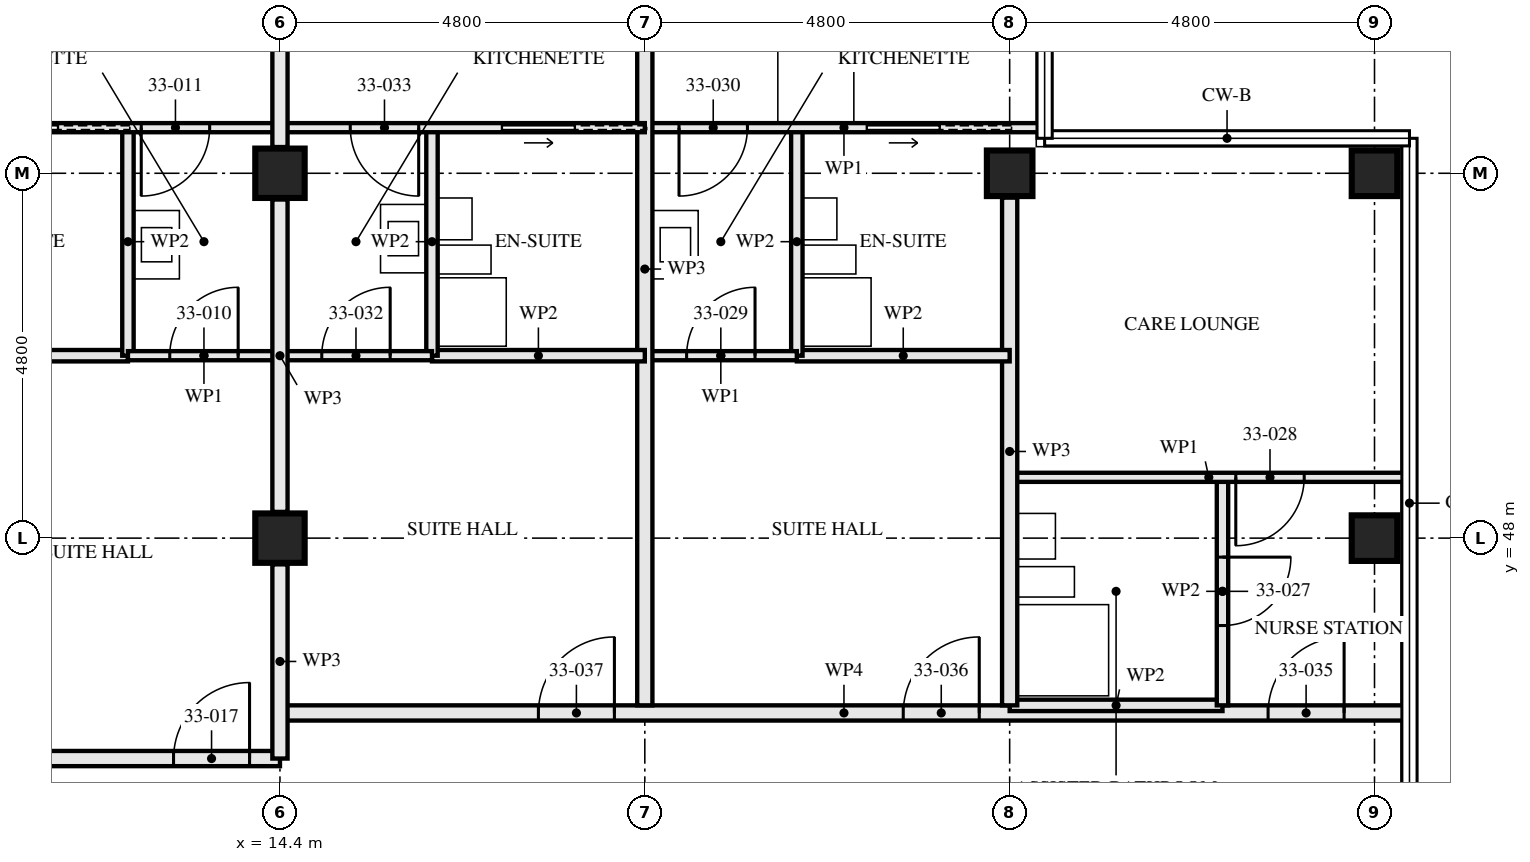
"""IFC4 building model, lengths in metres.
Left out: names, types, materials, properties, quantities, classifications, styles, units other than length and angle.
Written with IfcOpenShell. Run it as: python <this file> out.ifc"""

import sys

from ifc_helpers import new_model, si_unit, direction, frame, frame_2d, origin, origin_2d, place, context, subcontext, project, spatial, rectangle, hollow_rectangle, extrude, element, fill, save


model = new_model("IFC4")
c1 = context("Model", 3, precision=1e-05, world=origin(), true_north=direction((0.0, 1.0)))
c2 = subcontext(c1, "Body", "Model", "MODEL_VIEW")
j1 = project(units=[si_unit("LENGTHUNIT", "METRE"), si_unit("PLANEANGLEUNIT", "RADIAN")], contexts=[c1])
p1 = place(None, origin())
s1 = spatial("IfcSite", under=j1, at=p1, CompositionType="ELEMENT")
p2 = place(p1, origin())
s2 = spatial("IfcBuilding", under=s1, at=p2, CompositionType="ELEMENT")
p3 = place(p2, frame((0.0, 0.0, 122.5)))
s3 = spatial("IfcBuildingStorey", under=s2, at=p3, CompositionType="ELEMENT", Elevation=122.5)
for number, where, z_axis, x_axis in (
    (1, (14.4, 48.0, 0.0), (0.0, 0.0, 1.0), (1.0, 0.0, 0.0)),
    (2, (14.4, 52.8, 0.0), (0.0, 0.0, 1.0), (1.0, 0.0, 0.0)),
):
    element("IfcColumn", number, at=place(p3, frame(where, z_axis=z_axis, x_axis=x_axis)), inside=s3, PredefinedType="COLUMN", context=c2, shape_type="SweptSolid", body=[
        extrude(hollow_rectangle(XDim=0.65, YDim=0.65, WallThickness=0.05, at=origin_2d()), origin(), (0.0, 0.0, 1.0), 3.5),
    ])
for number, where, z_axis, x_axis in (
    (3, (24.0, 52.8, 0.0), (0.0, 0.0, 1.0), (0.0, 1.0, 0.0)),
    (4, (28.8, 48.0, 0.0), (0.0, 0.0, 1.0), (1.0, 0.0, 0.0)),
    (5, (28.8, 52.8, 0.0), (0.0, 0.0, 1.0), (0.0, 1.0, 0.0)),
):
    element("IfcColumn", number, at=place(p3, frame(where, z_axis=z_axis, x_axis=x_axis)), inside=s3, PredefinedType="COLUMN", context=c2, shape_type="SweptSolid", body=[
        extrude(hollow_rectangle(XDim=0.6, YDim=0.6, WallThickness=0.08, at=origin_2d()), origin(), (0.0, 0.0, 1.0), 3.5),
    ])
p4 = place(p3, frame((12.4, 53.4, 0.0), z_axis=(0.0, 0.0, 1.0), x_axis=(0.0, -1.0, 0.0)))
e6 = element("IfcWall", 6, at=p4, inside=s3, PredefinedType="PARTITIONING", context=c2, shape_type="SweptSolid", body=[
    extrude(rectangle(XDim=3.0, YDim=0.15, at=frame_2d((1.5, 0.0))), origin(), (0.0, 0.0, 1.0), 2.55),
])
p5 = place(p3, frame((12.4, 50.4, 0.0), z_axis=(0.0, 0.0, 1.0), x_axis=(-1.0, 0.0, 0.0)))
e7 = element("IfcWall", 7, at=p5, inside=s3, PredefinedType="PARTITIONING", context=c2, shape_type="SweptSolid", body=[
    extrude(rectangle(XDim=2.8, YDim=0.15, at=frame_2d((1.4, 0.0))), origin(), (0.0, 0.0, 1.0), 3.33),
])
p6 = place(p3, frame((14.4, 50.4, 0.0), z_axis=(0.0, 0.0, 1.0), x_axis=(-1.0, 0.0, 0.0)))
e8 = element("IfcWall", 8, at=p6, inside=s3, PredefinedType="PARTITIONING", context=c2, shape_type="SweptSolid", body=[
    extrude(rectangle(XDim=2.0, YDim=0.12, at=frame_2d((1.0, 0.0))), origin(), (0.0, 0.0, 1.0), 3.33),
])
p7 = place(p6, frame((0.55, 0.0, 0.0)))
e9 = element("IfcOpeningElement", 9, at=p7, cuts=e8, PredefinedType="OPENING", context=c2, shape_type="SweptSolid", body=[
    extrude(rectangle(XDim=0.9, YDim=2.1, at=frame_2d((0.45, 1.05))), frame((0.0, 0.071, 0.0), z_axis=(0.0, -1.0, 0.0), x_axis=(1.0, 0.0, 0.0)), (0.0, 0.0, 1.0), 0.141),
])
p8 = place(p3, frame((14.4, 53.4, 0.0), z_axis=(0.0, 0.0, 1.0), x_axis=(-1.0, 0.0, 0.0)))
e10 = element("IfcWall", 10, at=p8, inside=s3, PredefinedType="PARTITIONING", context=c2, shape_type="SweptSolid", body=[
    extrude(rectangle(XDim=4.8, YDim=0.12, at=frame_2d((2.4, 0.0))), origin(), (0.0, 0.0, 1.0), 3.33),
])
p9 = place(p8, frame((0.925, 0.0, 0.0)))
e11 = element("IfcOpeningElement", 11, at=p9, cuts=e10, PredefinedType="OPENING", context=c2, shape_type="SweptSolid", body=[
    extrude(rectangle(XDim=0.9, YDim=2.1, at=frame_2d((0.45, 1.05))), frame((0.0, 0.071, 0.0), z_axis=(0.0, -1.0, 0.0), x_axis=(1.0, 0.0, 0.0)), (0.0, 0.0, 1.0), 0.141),
])
p10 = place(p8, frame((2.925, 0.0, 0.0)))
e12 = element("IfcOpeningElement", 12, at=p10, cuts=e10, PredefinedType="OPENING", context=c2, shape_type="SweptSolid", body=[
    extrude(rectangle(XDim=0.95, YDim=2.1, at=frame_2d((0.475, 1.05))), frame((0.0, 0.071, 0.0), z_axis=(0.0, -1.0, 0.0), x_axis=(1.0, 0.0, 0.0)), (0.0, 0.0, 1.0), 0.141),
])
p11 = place(p3, frame((14.4, 45.1, 0.0), z_axis=(0.0, 0.0, 1.0), x_axis=(-1.0, 0.0, 0.0)))
e13 = element("IfcWall", 13, at=p11, inside=s3, PredefinedType="PARTITIONING", context=c2, shape_type="SweptSolid", body=[
    extrude(rectangle(XDim=9.6, YDim=0.2, at=frame_2d((4.8, 0.0))), origin(), (0.0, 0.0, 1.0), 3.33),
])
p12 = place(p11, frame((0.4, 0.0, 0.0)))
e14 = element("IfcOpeningElement", 14, at=p12, cuts=e13, PredefinedType="OPENING", context=c2, shape_type="SweptSolid", body=[
    extrude(rectangle(XDim=1.0, YDim=2.1, at=frame_2d((0.5, 1.05))), frame((0.0, 0.111, 0.0), z_axis=(0.0, -1.0, 0.0), x_axis=(1.0, 0.0, 0.0)), (0.0, 0.0, 1.0), 0.221),
])
p13 = place(p11, frame((5.2, 0.0, 0.0)))
e15 = element("IfcOpeningElement", 15, at=p13, cuts=e13, PredefinedType="OPENING", context=c2, shape_type="SweptSolid", body=[
    extrude(rectangle(XDim=1.0, YDim=2.1, at=frame_2d((0.5, 1.05))), frame((0.0, 0.111, 0.0), z_axis=(0.0, -1.0, 0.0), x_axis=(1.0, 0.0, 0.0)), (0.0, 0.0, 1.0), 0.221),
])
p14 = place(p3, frame((26.8, 48.8, 0.0), z_axis=(0.0, 0.0, 1.0), x_axis=(0.0, -1.0, 0.0)))
e16 = element("IfcWall", 16, at=p14, inside=s3, PredefinedType="PARTITIONING", context=c2, shape_type="SweptSolid", body=[
    extrude(rectangle(XDim=3.0, YDim=0.15, at=frame_2d((1.5, 0.0))), origin(), (0.0, 0.0, 1.0), 2.55),
])
p15 = place(p14, frame((1.05, 0.0, 0.0)))
e17 = element("IfcOpeningElement", 17, at=p15, cuts=e16, PredefinedType="OPENING", context=c2, shape_type="SweptSolid", body=[
    extrude(rectangle(XDim=0.9, YDim=2.1, at=frame_2d((0.45, 1.05))), frame((0.0, 0.085, 0.0), z_axis=(0.0, -1.0, 0.0), x_axis=(1.0, 0.0, 0.0)), (0.0, 0.0, 1.0), 0.171),
])
p16 = place(p3, frame((26.8, 45.8, 0.0), z_axis=(0.0, 0.0, 1.0), x_axis=(-1.0, 0.0, 0.0)))
e18 = element("IfcWall", 18, at=p16, inside=s3, PredefinedType="PARTITIONING", context=c2, shape_type="SweptSolid", body=[
    extrude(rectangle(XDim=2.8, YDim=0.15, at=frame_2d((1.4, 0.0))), origin(), (0.0, 0.0, 1.0), 3.33),
])
p17 = place(p3, frame((29.24, 48.8, 0.0), z_axis=(0.0, 0.0, 1.0), x_axis=(-1.0, 0.0, 0.0)))
e19 = element("IfcWall", 19, at=p17, inside=s3, PredefinedType="PARTITIONING", context=c2, shape_type="SweptSolid", body=[
    extrude(rectangle(XDim=5.24, YDim=0.12, at=frame_2d((2.62, 0.0))), origin(), (0.0, 0.0, 1.0), 2.32),
])
p18 = place(p17, frame((1.365, 0.0, 0.0)))
e20 = element("IfcOpeningElement", 20, at=p18, cuts=e19, PredefinedType="OPENING", context=c2, shape_type="SweptSolid", body=[
    extrude(rectangle(XDim=0.9, YDim=2.1, at=frame_2d((0.45, 1.05))), frame((0.0, 0.071, 0.0), z_axis=(0.0, -1.0, 0.0), x_axis=(1.0, 0.0, 0.0)), (0.0, 0.0, 1.0), 0.141),
])
p19 = place(p3, frame((24.0, 52.48, 0.0), z_axis=(0.0, 0.0, 1.0), x_axis=(0.0, -1.0, 0.0)))
e21 = element("IfcWall", 21, at=p19, inside=s3, PredefinedType="PARTITIONING", context=c2, shape_type="SweptSolid", body=[
    extrude(rectangle(XDim=6.68, YDim=0.2, at=frame_2d((3.34, 0.0))), origin(), (0.0, 0.0, 1.0), 2.55),
])
p20 = place(p3, frame((21.2, 53.4, 0.0), z_axis=(0.0, 0.0, 1.0), x_axis=(0.0, -1.0, 0.0)))
e22 = element("IfcWall", 22, at=p20, inside=s3, PredefinedType="PARTITIONING", context=c2, shape_type="SweptSolid", body=[
    extrude(rectangle(XDim=3.0, YDim=0.15, at=frame_2d((1.5, 0.0))), origin(), (0.0, 0.0, 1.0), 2.55),
])
p21 = place(p3, frame((24.0, 50.4, 0.0), z_axis=(0.0, 0.0, 1.0), x_axis=(-1.0, 0.0, 0.0)))
e23 = element("IfcWall", 23, at=p21, inside=s3, PredefinedType="PARTITIONING", context=c2, shape_type="SweptSolid", body=[
    extrude(rectangle(XDim=2.8, YDim=0.15, at=frame_2d((1.4, 0.0))), origin(), (0.0, 0.0, 1.0), 3.33),
])
p22 = place(p3, frame((21.2, 50.4, 0.0), z_axis=(0.0, 0.0, 1.0), x_axis=(-1.0, 0.0, 0.0)))
e24 = element("IfcWall", 24, at=p22, inside=s3, PredefinedType="PARTITIONING", context=c2, shape_type="SweptSolid", body=[
    extrude(rectangle(XDim=2.0, YDim=0.12, at=frame_2d((1.0, 0.0))), origin(), (0.0, 0.0, 1.0), 3.33),
])
p23 = place(p22, frame((0.55, 0.0, 0.0)))
e25 = element("IfcOpeningElement", 25, at=p23, cuts=e24, PredefinedType="OPENING", context=c2, shape_type="SweptSolid", body=[
    extrude(rectangle(XDim=0.9, YDim=2.1, at=frame_2d((0.45, 1.05))), frame((0.0, 0.071, 0.0), z_axis=(0.0, -1.0, 0.0), x_axis=(1.0, 0.0, 0.0)), (0.0, 0.0, 1.0), 0.141),
])
p24 = place(p3, frame((24.44, 53.4, 0.0), z_axis=(0.0, 0.0, 1.0), x_axis=(-1.0, 0.0, 0.0)))
e26 = element("IfcWall", 26, at=p24, inside=s3, PredefinedType="PARTITIONING", context=c2, shape_type="SweptSolid", body=[
    extrude(rectangle(XDim=5.24, YDim=0.12, at=frame_2d((2.62, 0.0))), origin(), (0.0, 0.0, 1.0), 2.32),
])
p25 = place(p24, frame((3.89, 0.0, 0.0)))
e27 = element("IfcOpeningElement", 27, at=p25, cuts=e26, PredefinedType="OPENING", context=c2, shape_type="SweptSolid", body=[
    extrude(rectangle(XDim=0.9, YDim=2.1, at=frame_2d((0.45, 1.05))), frame((0.0, 0.071, 0.0), z_axis=(0.0, -1.0, 0.0), x_axis=(1.0, 0.0, 0.0)), (0.0, 0.0, 1.0), 0.141),
])
p26 = place(p24, frame((1.365, 0.0, 0.0)))
e28 = element("IfcOpeningElement", 28, at=p26, cuts=e26, PredefinedType="OPENING", context=c2, shape_type="SweptSolid", body=[
    extrude(rectangle(XDim=0.95, YDim=2.1, at=frame_2d((0.475, 1.05))), frame((0.0, 0.071, 0.0), z_axis=(0.0, -1.0, 0.0), x_axis=(1.0, 0.0, 0.0)), (0.0, 0.0, 1.0), 0.141),
])
p27 = place(p3, frame((19.2, 57.28, 0.0), z_axis=(0.0, 0.0, 1.0), x_axis=(0.0, -1.0, 0.0)))
e29 = element("IfcWall", 29, at=p27, inside=s3, PredefinedType="PARTITIONING", context=c2, shape_type="SweptSolid", body=[
    extrude(rectangle(XDim=11.48, YDim=0.2, at=frame_2d((5.74, 0.0))), origin(), (0.0, 0.0, 1.0), 2.55),
])
p28 = place(p3, frame((16.4, 53.4, 0.0), z_axis=(0.0, 0.0, 1.0), x_axis=(0.0, -1.0, 0.0)))
e30 = element("IfcWall", 30, at=p28, inside=s3, PredefinedType="PARTITIONING", context=c2, shape_type="SweptSolid", body=[
    extrude(rectangle(XDim=3.0, YDim=0.15, at=frame_2d((1.5, 0.0))), origin(), (0.0, 0.0, 1.0), 2.55),
])
p29 = place(p3, frame((19.2, 50.4, 0.0), z_axis=(0.0, 0.0, 1.0), x_axis=(-1.0, 0.0, 0.0)))
e31 = element("IfcWall", 31, at=p29, inside=s3, PredefinedType="PARTITIONING", context=c2, shape_type="SweptSolid", body=[
    extrude(rectangle(XDim=2.8, YDim=0.15, at=frame_2d((1.4, 0.0))), origin(), (0.0, 0.0, 1.0), 3.33),
])
p30 = place(p3, frame((16.4, 50.4, 0.0), z_axis=(0.0, 0.0, 1.0), x_axis=(-1.0, 0.0, 0.0)))
e32 = element("IfcWall", 32, at=p30, inside=s3, PredefinedType="PARTITIONING", context=c2, shape_type="SweptSolid", body=[
    extrude(rectangle(XDim=2.0, YDim=0.12, at=frame_2d((1.0, 0.0))), origin(), (0.0, 0.0, 1.0), 3.33),
])
p31 = place(p30, frame((0.55, 0.0, 0.0)))
e33 = element("IfcOpeningElement", 33, at=p31, cuts=e32, PredefinedType="OPENING", context=c2, shape_type="SweptSolid", body=[
    extrude(rectangle(XDim=0.9, YDim=2.1, at=frame_2d((0.45, 1.05))), frame((0.0, 0.071, 0.0), z_axis=(0.0, -1.0, 0.0), x_axis=(1.0, 0.0, 0.0)), (0.0, 0.0, 1.0), 0.141),
])
p32 = place(p3, frame((19.2, 53.4, 0.0), z_axis=(0.0, 0.0, 1.0), x_axis=(-1.0, 0.0, 0.0)))
e34 = element("IfcWall", 34, at=p32, inside=s3, PredefinedType="PARTITIONING", context=c2, shape_type="SweptSolid", body=[
    extrude(rectangle(XDim=4.8, YDim=0.12, at=frame_2d((2.4, 0.0))), origin(), (0.0, 0.0, 1.0), 3.33),
])
p33 = place(p32, frame((2.975, 0.0, 0.0)))
e35 = element("IfcOpeningElement", 35, at=p33, cuts=e34, PredefinedType="OPENING", context=c2, shape_type="SweptSolid", body=[
    extrude(rectangle(XDim=0.9, YDim=2.1, at=frame_2d((0.45, 1.05))), frame((0.0, 0.071, 0.0), z_axis=(0.0, -1.0, 0.0), x_axis=(1.0, 0.0, 0.0)), (0.0, 0.0, 1.0), 0.141),
])
p34 = place(p32, frame((0.925, 0.0, 0.0)))
e36 = element("IfcOpeningElement", 36, at=p34, cuts=e34, PredefinedType="OPENING", context=c2, shape_type="SweptSolid", body=[
    extrude(rectangle(XDim=0.95, YDim=2.1, at=frame_2d((0.475, 1.05))), frame((0.0, 0.071, 0.0), z_axis=(0.0, -1.0, 0.0), x_axis=(1.0, 0.0, 0.0)), (0.0, 0.0, 1.0), 0.141),
])
p35 = place(p3, frame((29.24, 45.7, 0.0), z_axis=(0.0, 0.0, 1.0), x_axis=(-1.0, 0.0, 0.0)))
e37 = element("IfcWall", 37, at=p35, inside=s3, PredefinedType="PARTITIONING", context=c2, shape_type="SweptSolid", body=[
    extrude(rectangle(XDim=14.84, YDim=0.2, at=frame_2d((7.42, 0.0))), origin(), (0.0, 0.0, 1.0), 2.32),
])
p36 = place(p35, frame((0.84, 0.0, 0.0)))
e38 = element("IfcOpeningElement", 38, at=p36, cuts=e37, PredefinedType="OPENING", context=c2, shape_type="SweptSolid", body=[
    extrude(rectangle(XDim=1.0, YDim=2.1, at=frame_2d((0.5, 1.05))), frame((0.0, 0.111, 0.0), z_axis=(0.0, -1.0, 0.0), x_axis=(1.0, 0.0, 0.0)), (0.0, 0.0, 1.0), 0.221),
])
p37 = place(p35, frame((5.64, 0.0, 0.0)))
e39 = element("IfcOpeningElement", 39, at=p37, cuts=e37, PredefinedType="OPENING", context=c2, shape_type="SweptSolid", body=[
    extrude(rectangle(XDim=1.0, YDim=2.1, at=frame_2d((0.5, 1.05))), frame((0.0, 0.111, 0.0), z_axis=(0.0, -1.0, 0.0), x_axis=(1.0, 0.0, 0.0)), (0.0, 0.0, 1.0), 0.221),
])
p38 = place(p35, frame((10.44, 0.0, 0.0)))
e40 = element("IfcOpeningElement", 40, at=p38, cuts=e37, PredefinedType="OPENING", context=c2, shape_type="SweptSolid", body=[
    extrude(rectangle(XDim=1.0, YDim=2.1, at=frame_2d((0.5, 1.05))), frame((0.0, 0.111, 0.0), z_axis=(0.0, -1.0, 0.0), x_axis=(1.0, 0.0, 0.0)), (0.0, 0.0, 1.0), 0.221),
])
p39 = place(p3, frame((14.4, 45.1, 0.0), z_axis=(0.0, 0.0, 1.0), x_axis=(0.0, 1.0, 0.0)))
e41 = element("IfcWall", 41, at=p39, inside=s3, PredefinedType="PARTITIONING", context=c2, shape_type="SweptSolid", body=[
    extrude(rectangle(XDim=2.555, YDim=0.2, at=frame_2d((1.277, 0.0))), origin(), (0.0, 0.0, 1.0), 2.32),
])
p40 = place(p3, frame((14.4, 48.345, 0.0), z_axis=(0.0, 0.0, 1.0), x_axis=(0.0, 1.0, 0.0)))
e42 = element("IfcWall", 42, at=p40, inside=s3, PredefinedType="PARTITIONING", context=c2, shape_type="SweptSolid", body=[
    extrude(rectangle(XDim=4.11, YDim=0.2, at=frame_2d((2.055, 0.0))), origin(), (0.0, 0.0, 1.0), 2.32),
])
p41 = place(p3, frame((14.4, 53.145, 0.0), z_axis=(0.0, 0.0, 1.0), x_axis=(0.0, 1.0, 0.0)))
e43 = element("IfcWall", 43, at=p41, inside=s3, PredefinedType="PARTITIONING", context=c2, shape_type="SweptSolid", body=[
    extrude(rectangle(XDim=4.135, YDim=0.2, at=frame_2d((2.067, 0.0))), origin(), (0.0, 0.0, 1.0), 2.32),
])
p42 = place(p7, frame((0.9, 0.0, 0.0), z_axis=(0.0, 0.0, 1.0), x_axis=(-1.0, 0.0, 0.0)))
e44 = element("IfcDoor", 44, at=p42, inside=s3, OperationType="SINGLE_SWING_LEFT", PredefinedType="DOOR", context=c2, shape_type="SweptSolid", body=[
    extrude(rectangle(XDim=0.9, YDim=2.1, at=frame_2d((0.45, 1.05))), frame((0.0, 0.022, 0.0), z_axis=(0.0, -1.0, 0.0), x_axis=(1.0, 0.0, 0.0)), (0.0, 0.0, 1.0), 0.044),
])
fill(e9, e44)
p43 = place(p9, origin())
e45 = element("IfcDoor", 45, at=p43, inside=s3, OperationType="SINGLE_SWING_LEFT", PredefinedType="DOOR", context=c2, shape_type="SweptSolid", body=[
    extrude(rectangle(XDim=0.9, YDim=2.1, at=frame_2d((0.45, 1.05))), frame((0.0, 0.022, 0.0), z_axis=(0.0, -1.0, 0.0), x_axis=(1.0, 0.0, 0.0)), (0.0, 0.0, 1.0), 0.044),
])
fill(e11, e45)
p44 = place(p10, origin())
e46 = element("IfcDoor", 46, at=p44, inside=s3, OperationType="SLIDING_TO_RIGHT", PredefinedType="DOOR", context=c2, shape_type="SweptSolid", body=[
    extrude(rectangle(XDim=0.95, YDim=2.1, at=frame_2d((0.475, 1.05))), frame((0.0, 0.022, 0.0), z_axis=(0.0, -1.0, 0.0), x_axis=(1.0, 0.0, 0.0)), (0.0, 0.0, 1.0), 0.044),
])
fill(e12, e46)
p45 = place(p12, frame((1.0, 0.0, 0.0), z_axis=(0.0, 0.0, 1.0), x_axis=(-1.0, 0.0, 0.0)))
e47 = element("IfcDoor", 47, at=p45, inside=s3, OperationType="SINGLE_SWING_LEFT", PredefinedType="DOOR", context=c2, shape_type="SweptSolid", body=[
    extrude(rectangle(XDim=1.0, YDim=2.1, at=frame_2d((0.5, 1.05))), frame((0.0, 0.027, 0.0), z_axis=(0.0, -1.0, 0.0), x_axis=(1.0, 0.0, 0.0)), (0.0, 0.0, 1.0), 0.054),
])
fill(e14, e47)
p46 = place(p15, origin())
e48 = element("IfcDoor", 48, at=p46, inside=s3, OperationType="SINGLE_SWING_RIGHT", PredefinedType="DOOR", context=c2, shape_type="SweptSolid", body=[
    extrude(rectangle(XDim=0.9, YDim=2.1, at=frame_2d((0.45, 1.05))), frame((0.0, 0.022, 0.0), z_axis=(0.0, -1.0, 0.0), x_axis=(1.0, 0.0, 0.0)), (0.0, 0.0, 1.0), 0.044),
])
fill(e17, e48)
p47 = place(p18, origin())
e49 = element("IfcDoor", 49, at=p47, inside=s3, OperationType="SINGLE_SWING_LEFT", PredefinedType="DOOR", context=c2, shape_type="SweptSolid", body=[
    extrude(rectangle(XDim=0.9, YDim=2.1, at=frame_2d((0.45, 1.05))), frame((0.0, 0.022, 0.0), z_axis=(0.0, -1.0, 0.0), x_axis=(1.0, 0.0, 0.0)), (0.0, 0.0, 1.0), 0.044),
])
fill(e20, e49)
p48 = place(p23, frame((0.9, 0.0, 0.0), z_axis=(0.0, 0.0, 1.0), x_axis=(-1.0, 0.0, 0.0)))
e50 = element("IfcDoor", 50, at=p48, inside=s3, OperationType="SINGLE_SWING_LEFT", PredefinedType="DOOR", context=c2, shape_type="SweptSolid", body=[
    extrude(rectangle(XDim=0.9, YDim=2.1, at=frame_2d((0.45, 1.05))), frame((0.0, 0.022, 0.0), z_axis=(0.0, -1.0, 0.0), x_axis=(1.0, 0.0, 0.0)), (0.0, 0.0, 1.0), 0.044),
])
fill(e25, e50)
p49 = place(p25, origin())
e51 = element("IfcDoor", 51, at=p49, inside=s3, OperationType="SINGLE_SWING_LEFT", PredefinedType="DOOR", context=c2, shape_type="SweptSolid", body=[
    extrude(rectangle(XDim=0.9, YDim=2.1, at=frame_2d((0.45, 1.05))), frame((0.0, 0.022, 0.0), z_axis=(0.0, -1.0, 0.0), x_axis=(1.0, 0.0, 0.0)), (0.0, 0.0, 1.0), 0.044),
])
fill(e27, e51)
p50 = place(p26, origin())
e52 = element("IfcDoor", 52, at=p50, inside=s3, OperationType="SLIDING_TO_RIGHT", PredefinedType="DOOR", context=c2, shape_type="SweptSolid", body=[
    extrude(rectangle(XDim=0.95, YDim=2.1, at=frame_2d((0.475, 1.05))), frame((0.0, 0.022, 0.0), z_axis=(0.0, -1.0, 0.0), x_axis=(1.0, 0.0, 0.0)), (0.0, 0.0, 1.0), 0.044),
])
fill(e28, e52)
p51 = place(p31, frame((0.9, 0.0, 0.0), z_axis=(0.0, 0.0, 1.0), x_axis=(-1.0, 0.0, 0.0)))
e53 = element("IfcDoor", 53, at=p51, inside=s3, OperationType="SINGLE_SWING_LEFT", PredefinedType="DOOR", context=c2, shape_type="SweptSolid", body=[
    extrude(rectangle(XDim=0.9, YDim=2.1, at=frame_2d((0.45, 1.05))), frame((0.0, 0.022, 0.0), z_axis=(0.0, -1.0, 0.0), x_axis=(1.0, 0.0, 0.0)), (0.0, 0.0, 1.0), 0.044),
])
fill(e33, e53)
p52 = place(p33, origin())
e54 = element("IfcDoor", 54, at=p52, inside=s3, OperationType="SINGLE_SWING_RIGHT", PredefinedType="DOOR", context=c2, shape_type="SweptSolid", body=[
    extrude(rectangle(XDim=0.9, YDim=2.1, at=frame_2d((0.45, 1.05))), frame((0.0, 0.022, 0.0), z_axis=(0.0, -1.0, 0.0), x_axis=(1.0, 0.0, 0.0)), (0.0, 0.0, 1.0), 0.044),
])
fill(e35, e54)
p53 = place(p34, origin())
e55 = element("IfcDoor", 55, at=p53, inside=s3, OperationType="SLIDING_TO_RIGHT", PredefinedType="DOOR", context=c2, shape_type="SweptSolid", body=[
    extrude(rectangle(XDim=0.95, YDim=2.1, at=frame_2d((0.475, 1.05))), frame((0.0, 0.022, 0.0), z_axis=(0.0, -1.0, 0.0), x_axis=(1.0, 0.0, 0.0)), (0.0, 0.0, 1.0), 0.044),
])
fill(e36, e55)
p54 = place(p36, frame((1.0, 0.0, 0.0), z_axis=(0.0, 0.0, 1.0), x_axis=(-1.0, 0.0, 0.0)))
e56 = element("IfcDoor", 56, at=p54, inside=s3, OperationType="SINGLE_SWING_LEFT", PredefinedType="DOOR", context=c2, shape_type="SweptSolid", body=[
    extrude(rectangle(XDim=1.0, YDim=2.1, at=frame_2d((0.5, 1.05))), frame((0.0, 0.027, 0.0), z_axis=(0.0, -1.0, 0.0), x_axis=(1.0, 0.0, 0.0)), (0.0, 0.0, 1.0), 0.054),
])
fill(e38, e56)
p55 = place(p37, frame((1.0, 0.0, 0.0), z_axis=(0.0, 0.0, 1.0), x_axis=(-1.0, 0.0, 0.0)))
e57 = element("IfcDoor", 57, at=p55, inside=s3, OperationType="SINGLE_SWING_LEFT", PredefinedType="DOOR", context=c2, shape_type="SweptSolid", body=[
    extrude(rectangle(XDim=1.0, YDim=2.1, at=frame_2d((0.5, 1.05))), frame((0.0, 0.027, 0.0), z_axis=(0.0, -1.0, 0.0), x_axis=(1.0, 0.0, 0.0)), (0.0, 0.0, 1.0), 0.054),
])
fill(e39, e57)
p56 = place(p38, frame((1.0, 0.0, 0.0), z_axis=(0.0, 0.0, 1.0), x_axis=(-1.0, 0.0, 0.0)))
e58 = element("IfcDoor", 58, at=p56, inside=s3, OperationType="SINGLE_SWING_LEFT", PredefinedType="DOOR", context=c2, shape_type="SweptSolid", body=[
    extrude(rectangle(XDim=1.0, YDim=2.1, at=frame_2d((0.5, 1.05))), frame((0.0, 0.027, 0.0), z_axis=(0.0, -1.0, 0.0), x_axis=(1.0, 0.0, 0.0)), (0.0, 0.0, 1.0), 0.054),
])
fill(e40, e58)
save(model, sys.argv[1])
